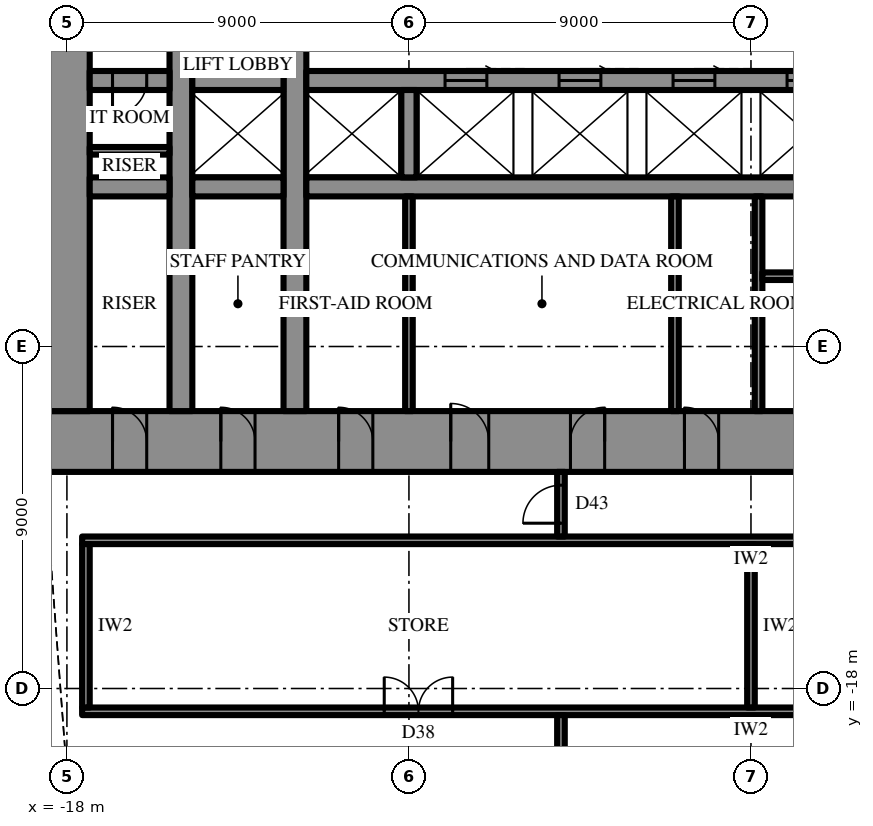
"""IFC4 building model, lengths in metres.
Left out: names, types, materials, properties, quantities, classifications, styles, units other than length and angle.
Written with IfcOpenShell. Run it as: python <this file> out.ifc"""

import sys

from ifc_helpers import new_model, si_unit, direction, frame, frame_2d, origin, place, context, subcontext, project, spatial, rectangle, extrude, element, fill, save


model = new_model("IFC4")
c1 = context("Model", 3, precision=1e-05, world=origin(), true_north=direction((0.0, 1.0)))
c2 = subcontext(c1, "Body", "Model", "MODEL_VIEW")
j1 = project(units=[si_unit("LENGTHUNIT", "METRE"), si_unit("PLANEANGLEUNIT", "RADIAN")], contexts=[c1])
p1 = place(None, origin())
s1 = spatial("IfcSite", under=j1, at=p1, CompositionType="ELEMENT")
p2 = place(p1, origin())
s2 = spatial("IfcBuilding", under=s1, at=p2, CompositionType="ELEMENT")
p3 = place(p2, frame((0.0, 0.0, 174.1)))
s3 = spatial("IfcBuildingStorey", under=s2, at=p3, CompositionType="ELEMENT", Elevation=174.1)
p4 = place(p3, frame((18.6, -11.5, 0.0), z_axis=(0.0, 0.0, 1.0), x_axis=(-1.0, 0.0, 0.0)))
e1 = element("IfcWall", 1, at=p4, inside=s3, PredefinedType="SHEAR", context=c2, shape_type="SweptSolid", body=[
    extrude(rectangle(XDim=37.2, YDim=1.6, at=frame_2d((18.6, 0.0))), origin(), (0.0, 0.0, 1.0), 4.2),
])
p5 = place(p4, frame((19.45, 0.0, 0.0)))
e2 = element("IfcOpeningElement", 2, at=p5, cuts=e1, PredefinedType="OPENING", context=c2, shape_type="SweptSolid", body=[
    extrude(rectangle(XDim=0.9, YDim=2.2, at=frame_2d((0.45, 1.1))), frame((0.0, 0.81, 0.0), z_axis=(0.0, -1.0, 0.0), x_axis=(1.0, 0.0, 0.0)), (0.0, 0.0, 1.0), 1.62),
])
p6 = place(p4, frame((22.45, 0.0, 0.0)))
e3 = element("IfcOpeningElement", 3, at=p6, cuts=e1, PredefinedType="OPENING", context=c2, shape_type="SweptSolid", body=[
    extrude(rectangle(XDim=0.9, YDim=2.2, at=frame_2d((0.45, 1.1))), frame((0.0, 0.81, 0.0), z_axis=(0.0, -1.0, 0.0), x_axis=(1.0, 0.0, 0.0)), (0.0, 0.0, 1.0), 1.62),
])
p7 = place(p4, frame((25.5, 0.0, 0.0)))
e4 = element("IfcOpeningElement", 4, at=p7, cuts=e1, PredefinedType="OPENING", context=c2, shape_type="SweptSolid", body=[
    extrude(rectangle(XDim=1.0, YDim=2.2, at=frame_2d((0.5, 1.1))), frame((0.0, 0.81, 0.0), z_axis=(0.0, -1.0, 0.0), x_axis=(1.0, 0.0, 0.0)), (0.0, 0.0, 1.0), 1.62),
])
p8 = place(p4, frame((1.8, 0.0, 0.0)))
e5 = element("IfcOpeningElement", 5, at=p8, cuts=e1, PredefinedType="OPENING", context=c2, shape_type="SweptSolid", body=[
    extrude(rectangle(XDim=0.9, YDim=2.2, at=frame_2d((0.45, 1.1))), frame((0.0, 0.81, 0.0), z_axis=(0.0, -1.0, 0.0), x_axis=(1.0, 0.0, 0.0)), (0.0, 0.0, 1.0), 1.62),
])
p9 = place(p4, frame((4.65, 0.0, 0.0)))
e6 = element("IfcOpeningElement", 6, at=p9, cuts=e1, PredefinedType="OPENING", context=c2, shape_type="SweptSolid", body=[
    extrude(rectangle(XDim=0.9, YDim=2.2, at=frame_2d((0.45, 1.1))), frame((0.0, 0.81, 0.0), z_axis=(0.0, -1.0, 0.0), x_axis=(1.0, 0.0, 0.0)), (0.0, 0.0, 1.0), 1.62),
])
p10 = place(p4, frame((7.75, 0.0, 0.0)))
e7 = element("IfcOpeningElement", 7, at=p10, cuts=e1, PredefinedType="OPENING", context=c2, shape_type="SweptSolid", body=[
    extrude(rectangle(XDim=0.9, YDim=2.2, at=frame_2d((0.45, 1.1))), frame((0.0, 0.81, 0.0), z_axis=(0.0, -1.0, 0.0), x_axis=(1.0, 0.0, 0.0)), (0.0, 0.0, 1.0), 1.62),
])
p11 = place(p4, frame((28.55, 0.0, 0.0)))
e8 = element("IfcOpeningElement", 8, at=p11, cuts=e1, PredefinedType="OPENING", context=c2, shape_type="SweptSolid", body=[
    extrude(rectangle(XDim=0.9, YDim=2.2, at=frame_2d((0.45, 1.1))), frame((0.0, 0.81, 0.0), z_axis=(0.0, -1.0, 0.0), x_axis=(1.0, 0.0, 0.0)), (0.0, 0.0, 1.0), 1.62),
])
p12 = place(p4, frame((31.65, 0.0, 0.0)))
e9 = element("IfcOpeningElement", 9, at=p12, cuts=e1, PredefinedType="OPENING", context=c2, shape_type="SweptSolid", body=[
    extrude(rectangle(XDim=0.9, YDim=2.2, at=frame_2d((0.45, 1.1))), frame((0.0, 0.81, 0.0), z_axis=(0.0, -1.0, 0.0), x_axis=(1.0, 0.0, 0.0)), (0.0, 0.0, 1.0), 1.62),
])
p13 = place(p4, frame((34.5, 0.0, 0.0)))
e10 = element("IfcOpeningElement", 10, at=p13, cuts=e1, PredefinedType="OPENING", context=c2, shape_type="SweptSolid", body=[
    extrude(rectangle(XDim=0.9, YDim=2.2, at=frame_2d((0.45, 1.1))), frame((0.0, 0.81, 0.0), z_axis=(0.0, -1.0, 0.0), x_axis=(1.0, 0.0, 0.0)), (0.0, 0.0, 1.0), 1.62),
])
p14 = place(p3, frame((-18.0, 10.7, 0.0), z_axis=(0.0, 0.0, 1.0), x_axis=(0.0, -1.0, 0.0)))
e11 = element("IfcWall", 11, at=p14, inside=s3, PredefinedType="SHEAR", context=c2, shape_type="SweptSolid", body=[
    extrude(rectangle(XDim=21.4, YDim=1.2, at=frame_2d((10.7, 0.0))), origin(), (0.0, 0.0, 1.0), 4.2),
])
p15 = place(p14, frame((9.8, 0.0, 0.0)))
e12 = element("IfcOpeningElement", 12, at=p15, cuts=e11, PredefinedType="OPENING", context=c2, shape_type="SweptSolid", body=[
    extrude(rectangle(XDim=1.8, YDim=2.4, at=frame_2d((0.9, 1.2))), frame((0.0, 0.61, 0.0), z_axis=(0.0, -1.0, 0.0), x_axis=(1.0, 0.0, 0.0)), (0.0, 0.0, 1.0), 1.22),
])
p16 = place(p3, frame((-12.0, -10.7, 0.0), z_axis=(0.0, 0.0, 1.0), x_axis=(0.0, 1.0, 0.0)))
e13 = element("IfcWall", 13, at=p16, inside=s3, PredefinedType="SHEAR", context=c2, shape_type="SweptSolid", body=[
    extrude(rectangle(XDim=21.4, YDim=0.6, at=frame_2d((10.7, 0.0))), origin(), (0.0, 0.0, 1.0), 4.2),
])
p17 = place(p16, frame((9.8, 0.0, 0.0)))
e14 = element("IfcOpeningElement", 14, at=p17, cuts=e13, PredefinedType="OPENING", context=c2, shape_type="SweptSolid", body=[
    extrude(rectangle(XDim=1.8, YDim=2.4, at=frame_2d((0.9, 1.2))), frame((0.0, 0.31, 0.0), z_axis=(0.0, -1.0, 0.0), x_axis=(1.0, 0.0, 0.0)), (0.0, 0.0, 1.0), 0.62),
])
p18 = place(p3, frame((-15.0, -10.7, 0.0), z_axis=(0.0, 0.0, 1.0), x_axis=(0.0, 1.0, 0.0)))
e15 = element("IfcWall", 15, at=p18, inside=s3, PredefinedType="SHEAR", context=c2, shape_type="SweptSolid", body=[
    extrude(rectangle(XDim=21.4, YDim=0.6, at=frame_2d((10.7, 0.0))), origin(), (0.0, 0.0, 1.0), 4.2),
])
p19 = place(p18, frame((9.8, 0.0, 0.0)))
e16 = element("IfcOpeningElement", 16, at=p19, cuts=e15, PredefinedType="OPENING", context=c2, shape_type="SweptSolid", body=[
    extrude(rectangle(XDim=1.8, YDim=2.4, at=frame_2d((0.9, 1.2))), frame((0.0, 0.31, 0.0), z_axis=(0.0, -1.0, 0.0), x_axis=(1.0, 0.0, 0.0)), (0.0, 0.0, 1.0), 0.62),
])
p20 = place(p3, frame((3.2, -2.0, 0.0), z_axis=(0.0, 0.0, 1.0), x_axis=(-1.0, 0.0, 0.0)))
e17 = element("IfcWall", 17, at=p20, inside=s3, PredefinedType="SHEAR", context=c2, shape_type="SweptSolid", body=[
    extrude(rectangle(XDim=14.9, YDim=0.5, at=frame_2d((7.45, 0.0))), origin(), (0.0, 0.0, 1.0), 4.2),
])
p21 = place(p20, frame((1.15, 0.0, 0.0)))
e18 = element("IfcOpeningElement", 18, at=p21, cuts=e17, PredefinedType="OPENING", context=c2, shape_type="SweptSolid", body=[
    extrude(rectangle(XDim=1.1, YDim=2.2, at=frame_2d((0.55, 1.1))), frame((0.0, 0.26, 0.0), z_axis=(0.0, -1.0, 0.0), x_axis=(1.0, 0.0, 0.0)), (0.0, 0.0, 1.0), 0.52),
])
p22 = place(p20, frame((4.15, 0.0, 0.0)))
e19 = element("IfcOpeningElement", 19, at=p22, cuts=e17, PredefinedType="OPENING", context=c2, shape_type="SweptSolid", body=[
    extrude(rectangle(XDim=1.1, YDim=2.2, at=frame_2d((0.55, 1.1))), frame((0.0, 0.26, 0.0), z_axis=(0.0, -1.0, 0.0), x_axis=(1.0, 0.0, 0.0)), (0.0, 0.0, 1.0), 0.52),
])
p23 = place(p20, frame((7.15, 0.0, 0.0)))
e20 = element("IfcOpeningElement", 20, at=p23, cuts=e17, PredefinedType="OPENING", context=c2, shape_type="SweptSolid", body=[
    extrude(rectangle(XDim=1.1, YDim=2.2, at=frame_2d((0.55, 1.1))), frame((0.0, 0.26, 0.0), z_axis=(0.0, -1.0, 0.0), x_axis=(1.0, 0.0, 0.0)), (0.0, 0.0, 1.0), 0.52),
])
p24 = place(p20, frame((10.15, 0.0, 0.0)))
e21 = element("IfcOpeningElement", 21, at=p24, cuts=e17, PredefinedType="OPENING", context=c2, shape_type="SweptSolid", body=[
    extrude(rectangle(XDim=1.1, YDim=2.2, at=frame_2d((0.55, 1.1))), frame((0.0, 0.26, 0.0), z_axis=(0.0, -1.0, 0.0), x_axis=(1.0, 0.0, 0.0)), (0.0, 0.0, 1.0), 0.52),
])
p25 = place(p3, frame((-12.3, -2.0, 0.0), z_axis=(0.0, 0.0, 1.0), x_axis=(-1.0, 0.0, 0.0)))
e22 = element("IfcWall", 22, at=p25, inside=s3, PredefinedType="SHEAR", context=c2, shape_type="SweptSolid", body=[
    extrude(rectangle(XDim=2.4, YDim=0.5, at=frame_2d((1.2, 0.0))), origin(), (0.0, 0.0, 1.0), 4.2),
])
p26 = place(p3, frame((-15.3, -2.0, 0.0), z_axis=(0.0, 0.0, 1.0), x_axis=(-1.0, 0.0, 0.0)))
e23 = element("IfcWall", 23, at=p26, inside=s3, PredefinedType="SHEAR", context=c2, shape_type="SweptSolid", body=[
    extrude(rectangle(XDim=2.1, YDim=0.5, at=frame_2d((1.05, 0.0))), origin(), (0.0, 0.0, 1.0), 4.2),
])
p27 = place(p26, frame((0.6, 0.0, 0.0)))
e24 = element("IfcOpeningElement", 24, at=p27, cuts=e23, PredefinedType="OPENING", context=c2, shape_type="SweptSolid", body=[
    extrude(rectangle(XDim=0.9, YDim=2.2, at=frame_2d((0.45, 1.1))), frame((0.0, 0.26, 0.0), z_axis=(0.0, -1.0, 0.0), x_axis=(1.0, 0.0, 0.0)), (0.0, 0.0, 1.0), 0.52),
])
p28 = place(p3, frame((11.7, -4.8, 0.0), z_axis=(0.0, 0.0, 1.0), x_axis=(-1.0, 0.0, 0.0)))
e25 = element("IfcWall", 25, at=p28, inside=s3, PredefinedType="SHEAR", context=c2, shape_type="SweptSolid", body=[
    extrude(rectangle(XDim=23.4, YDim=0.5, at=frame_2d((11.7, 0.0))), origin(), (0.0, 0.0, 1.0), 4.2),
])
p29 = place(p28, frame((6.6, 0.0, 0.0)))
e26 = element("IfcOpeningElement", 26, at=p29, cuts=e25, PredefinedType="OPENING", context=c2, shape_type="SweptSolid", body=[
    extrude(rectangle(XDim=1.2, YDim=2.2, at=frame_2d((0.6, 1.1))), frame((0.0, 0.26, 0.0), z_axis=(0.0, -1.0, 0.0), x_axis=(1.0, 0.0, 0.0)), (0.0, 0.0, 1.0), 0.52),
])
p30 = place(p28, frame((3.6, 0.0, 0.0)))
e27 = element("IfcOpeningElement", 27, at=p30, cuts=e25, PredefinedType="OPENING", context=c2, shape_type="SweptSolid", body=[
    extrude(rectangle(XDim=1.2, YDim=2.2, at=frame_2d((0.6, 1.1))), frame((0.0, 0.26, 0.0), z_axis=(0.0, -1.0, 0.0), x_axis=(1.0, 0.0, 0.0)), (0.0, 0.0, 1.0), 0.52),
])
p31 = place(p3, frame((-12.3, -4.8, 0.0), z_axis=(0.0, 0.0, 1.0), x_axis=(-1.0, 0.0, 0.0)))
e28 = element("IfcWall", 28, at=p31, inside=s3, PredefinedType="SHEAR", context=c2, shape_type="SweptSolid", body=[
    extrude(rectangle(XDim=2.4, YDim=0.5, at=frame_2d((1.2, 0.0))), origin(), (0.0, 0.0, 1.0), 4.2),
])
p32 = place(p3, frame((-15.3, -4.8, 0.0), z_axis=(0.0, 0.0, 1.0), x_axis=(-1.0, 0.0, 0.0)))
e29 = element("IfcWall", 29, at=p32, inside=s3, PredefinedType="SHEAR", context=c2, shape_type="SweptSolid", body=[
    extrude(rectangle(XDim=2.1, YDim=0.5, at=frame_2d((1.05, 0.0))), origin(), (0.0, 0.0, 1.0), 4.2),
])
p33 = place(p3, frame((-9.0, -2.25, 0.0), z_axis=(0.0, 0.0, 1.0), x_axis=(0.0, -1.0, 0.0)))
e30 = element("IfcWall", 30, at=p33, inside=s3, PredefinedType="SHEAR", context=c2, shape_type="SweptSolid", body=[
    extrude(rectangle(XDim=2.3, YDim=0.4, at=frame_2d((1.15, 0.0))), origin(), (0.0, 0.0, 1.0), 4.2),
])
p34 = place(p3, frame((0.2, -5.05, 0.0), z_axis=(0.0, 0.0, 1.0), x_axis=(0.0, -1.0, 0.0)))
e31 = element("IfcWall", 31, at=p34, inside=s3, PredefinedType="SHEAR", context=c2, shape_type="SweptSolid", body=[
    extrude(rectangle(XDim=5.65, YDim=0.2, at=frame_2d((2.825, 0.0))), origin(), (0.0, 0.0, 1.0), 4.2),
])
p35 = place(p3, frame((8.9, -7.15, 0.0), z_axis=(0.0, 0.0, 1.0), x_axis=(-1.0, 0.0, 0.0)))
e32 = element("IfcWall", 32, at=p35, inside=s3, PredefinedType="SHEAR", context=c2, shape_type="SweptSolid", body=[
    extrude(rectangle(XDim=8.6, YDim=0.2, at=frame_2d((4.3, 0.0))), origin(), (0.0, 0.0, 1.0), 4.2),
])
p36 = place(p35, frame((0.3, 0.0, 0.0)))
e33 = element("IfcOpeningElement", 33, at=p36, cuts=e32, PredefinedType="OPENING", context=c2, shape_type="SweptSolid", body=[
    extrude(rectangle(XDim=1.0, YDim=2.2, at=frame_2d((0.5, 1.1))), frame((0.0, 0.11, 0.0), z_axis=(0.0, -1.0, 0.0), x_axis=(1.0, 0.0, 0.0)), (0.0, 0.0, 1.0), 0.22),
])
for number, where, z_axis, x_axis in (
    (34, (-9.0, -5.05, 0.0), (0.0, 0.0, 1.0), (0.0, -1.0, 0.0)),
    (35, (-2.0, -5.05, 0.0), (0.0, 0.0, 1.0), (0.0, -1.0, 0.0)),
):
    element("IfcWall", number, at=place(p3, frame(where, z_axis=z_axis, x_axis=x_axis)), inside=s3, PredefinedType="PARTITIONING", context=c2, shape_type="SweptSolid", body=[
        extrude(rectangle(XDim=5.65, YDim=0.2, at=frame_2d((2.825, 0.0))), origin(), (0.0, 0.0, 1.0), 4.0),
    ])
p37 = place(p3, frame((-15.3, -3.85, 0.0), z_axis=(0.0, 0.0, 1.0), x_axis=(-1.0, 0.0, 0.0)))
e36 = element("IfcWall", 36, at=p37, inside=s3, PredefinedType="PARTITIONING", context=c2, shape_type="SweptSolid", body=[
    extrude(rectangle(XDim=2.1, YDim=0.2, at=frame_2d((1.05, 0.0))), origin(), (0.0, 0.0, 1.0), 4.0),
])
p38 = place(p3, frame((17.6, -14.1, 0.0), z_axis=(0.0, 0.0, 1.0), x_axis=(-1.0, 0.0, 0.0)))
e37 = element("IfcWall", 37, at=p38, inside=s3, PredefinedType="PARTITIONING", context=c2, shape_type="SweptSolid", body=[
    extrude(rectangle(XDim=35.2, YDim=0.2, at=frame_2d((17.6, 0.0))), origin(), (0.0, 0.0, 1.0), 4.0),
])
p39 = place(p3, frame((17.6, -18.6, 0.0), z_axis=(0.0, 0.0, 1.0), x_axis=(-1.0, 0.0, 0.0)))
e38 = element("IfcWall", 38, at=p39, inside=s3, PredefinedType="PARTITIONING", context=c2, shape_type="SweptSolid", body=[
    extrude(rectangle(XDim=35.2, YDim=0.2, at=frame_2d((17.6, 0.0))), origin(), (0.0, 0.0, 1.0), 4.0),
])
p40 = place(p39, frame((7.95, 0.0, 0.0)))
e39 = element("IfcOpeningElement", 39, at=p40, cuts=e38, PredefinedType="OPENING", context=c2, shape_type="SweptSolid", body=[
    extrude(rectangle(XDim=1.8, YDim=2.4, at=frame_2d((0.9, 1.2))), frame((0.0, 0.11, 0.0), z_axis=(0.0, -1.0, 0.0), x_axis=(1.0, 0.0, 0.0)), (0.0, 0.0, 1.0), 0.22),
])
p41 = place(p39, frame((25.45, 0.0, 0.0)))
e40 = element("IfcOpeningElement", 40, at=p41, cuts=e38, PredefinedType="OPENING", context=c2, shape_type="SweptSolid", body=[
    extrude(rectangle(XDim=1.8, YDim=2.4, at=frame_2d((0.9, 1.2))), frame((0.0, 0.11, 0.0), z_axis=(0.0, -1.0, 0.0), x_axis=(1.0, 0.0, 0.0)), (0.0, 0.0, 1.0), 0.22),
])
p42 = place(p3, frame((0.0, -14.2, 0.0), z_axis=(0.0, 0.0, 1.0), x_axis=(0.0, -1.0, 0.0)))
e41 = element("IfcWall", 41, at=p42, inside=s3, PredefinedType="PARTITIONING", context=c2, shape_type="SweptSolid", body=[
    extrude(rectangle(XDim=4.3, YDim=0.2, at=frame_2d((2.15, 0.0))), origin(), (0.0, 0.0, 1.0), 2.992),
])
p43 = place(p3, frame((-17.5, -14.2, 0.0), z_axis=(0.0, 0.0, 1.0), x_axis=(0.0, -1.0, 0.0)))
e42 = element("IfcWall", 42, at=p43, inside=s3, PredefinedType="PARTITIONING", context=c2, shape_type="SweptSolid", body=[
    extrude(rectangle(XDim=4.3, YDim=0.2, at=frame_2d((2.15, 0.0))), origin(), (0.0, 0.0, 1.0), 4.0),
])
p44 = place(p3, frame((-5.0, -12.3, 0.0), z_axis=(0.0, 0.0, 1.0), x_axis=(0.0, -1.0, 0.0)))
e43 = element("IfcWall", 43, at=p44, inside=s3, PredefinedType="PARTITIONING", context=c2, shape_type="SweptSolid", body=[
    extrude(rectangle(XDim=1.7, YDim=0.2, at=frame_2d((0.85, 0.0))), origin(), (0.0, 0.0, 1.0), 2.992),
])
p45 = place(p44, frame((0.35, 0.0, 0.0)))
e44 = element("IfcOpeningElement", 44, at=p45, cuts=e43, PredefinedType="OPENING", context=c2, shape_type="SweptSolid", body=[
    extrude(rectangle(XDim=1.0, YDim=2.2, at=frame_2d((0.5, 1.1))), frame((0.0, 0.11, 0.0), z_axis=(0.0, -1.0, 0.0), x_axis=(1.0, 0.0, 0.0)), (0.0, 0.0, 1.0), 0.22),
])
p46 = place(p3, frame((-5.0, -18.7, 0.0), z_axis=(0.0, 0.0, 1.0), x_axis=(0.0, -1.0, 0.0)))
e45 = element("IfcWall", 45, at=p46, inside=s3, PredefinedType="PARTITIONING", context=c2, shape_type="SweptSolid", body=[
    extrude(rectangle(XDim=6.2, YDim=0.2, at=frame_2d((3.1, 0.0))), origin(), (0.0, 0.0, 1.0), 2.992),
])
p47 = place(p5, frame((0.9, 0.0, 0.0), z_axis=(0.0, 0.0, 1.0), x_axis=(-1.0, 0.0, 0.0)))
e46 = element("IfcDoor", 46, at=p47, inside=s3, OperationType="SINGLE_SWING_RIGHT", PredefinedType="DOOR", context=c2, shape_type="SweptSolid", body=[
    extrude(rectangle(XDim=0.9, YDim=2.2, at=frame_2d((0.45, 1.1))), frame((0.0, 0.025, 0.0), z_axis=(0.0, -1.0, 0.0), x_axis=(1.0, 0.0, 0.0)), (0.0, 0.0, 1.0), 0.05),
])
fill(e2, e46)
p48 = place(p6, frame((0.9, 0.0, 0.0), z_axis=(0.0, 0.0, 1.0), x_axis=(-1.0, 0.0, 0.0)))
e47 = element("IfcDoor", 47, at=p48, inside=s3, OperationType="SINGLE_SWING_LEFT", PredefinedType="DOOR", context=c2, shape_type="SweptSolid", body=[
    extrude(rectangle(XDim=0.9, YDim=2.2, at=frame_2d((0.45, 1.1))), frame((0.0, 0.025, 0.0), z_axis=(0.0, -1.0, 0.0), x_axis=(1.0, 0.0, 0.0)), (0.0, 0.0, 1.0), 0.05),
])
fill(e3, e47)
p49 = place(p7, frame((1.0, 0.0, 0.0), z_axis=(0.0, 0.0, 1.0), x_axis=(-1.0, 0.0, 0.0)))
e48 = element("IfcDoor", 48, at=p49, inside=s3, OperationType="SINGLE_SWING_RIGHT", PredefinedType="DOOR", context=c2, shape_type="SweptSolid", body=[
    extrude(rectangle(XDim=1.0, YDim=2.2, at=frame_2d((0.5, 1.1))), frame((0.0, 0.025, 0.0), z_axis=(0.0, -1.0, 0.0), x_axis=(1.0, 0.0, 0.0)), (0.0, 0.0, 1.0), 0.05),
])
fill(e4, e48)
p50 = place(p11, frame((0.9, 0.0, 0.0), z_axis=(0.0, 0.0, 1.0), x_axis=(-1.0, 0.0, 0.0)))
e49 = element("IfcDoor", 49, at=p50, inside=s3, OperationType="SINGLE_SWING_RIGHT", PredefinedType="DOOR", context=c2, shape_type="SweptSolid", body=[
    extrude(rectangle(XDim=0.9, YDim=2.2, at=frame_2d((0.45, 1.1))), frame((0.0, 0.025, 0.0), z_axis=(0.0, -1.0, 0.0), x_axis=(1.0, 0.0, 0.0)), (0.0, 0.0, 1.0), 0.05),
])
fill(e8, e49)
p51 = place(p12, frame((0.9, 0.0, 0.0), z_axis=(0.0, 0.0, 1.0), x_axis=(-1.0, 0.0, 0.0)))
e50 = element("IfcDoor", 50, at=p51, inside=s3, OperationType="SINGLE_SWING_RIGHT", PredefinedType="DOOR", context=c2, shape_type="SweptSolid", body=[
    extrude(rectangle(XDim=0.9, YDim=2.2, at=frame_2d((0.45, 1.1))), frame((0.0, 0.025, 0.0), z_axis=(0.0, -1.0, 0.0), x_axis=(1.0, 0.0, 0.0)), (0.0, 0.0, 1.0), 0.05),
])
fill(e9, e50)
p52 = place(p13, frame((0.9, 0.0, 0.0), z_axis=(0.0, 0.0, 1.0), x_axis=(-1.0, 0.0, 0.0)))
e51 = element("IfcDoor", 51, at=p52, inside=s3, OperationType="SINGLE_SWING_RIGHT", PredefinedType="DOOR", context=c2, shape_type="SweptSolid", body=[
    extrude(rectangle(XDim=0.9, YDim=2.2, at=frame_2d((0.45, 1.1))), frame((0.0, 0.025, 0.0), z_axis=(0.0, -1.0, 0.0), x_axis=(1.0, 0.0, 0.0)), (0.0, 0.0, 1.0), 0.05),
])
fill(e10, e51)
p53 = place(p27, origin())
e52 = element("IfcDoor", 52, at=p53, inside=s3, OperationType="SINGLE_SWING_LEFT", PredefinedType="DOOR", context=c2, shape_type="SweptSolid", body=[
    extrude(rectangle(XDim=0.9, YDim=2.2, at=frame_2d((0.45, 1.1))), frame((0.0, 0.025, 0.0), z_axis=(0.0, -1.0, 0.0), x_axis=(1.0, 0.0, 0.0)), (0.0, 0.0, 1.0), 0.05),
])
fill(e24, e52)
p54 = place(p21, frame((1.1, 0.0, 0.0), z_axis=(0.0, 0.0, 1.0), x_axis=(-1.0, 0.0, 0.0)))
e53 = element("IfcDoor", 53, at=p54, inside=s3, OperationType="SLIDING_TO_LEFT", PredefinedType="DOOR", context=c2, shape_type="SweptSolid", body=[
    extrude(rectangle(XDim=1.1, YDim=2.2, at=frame_2d((0.55, 1.1))), frame((0.0, 0.025, 0.0), z_axis=(0.0, -1.0, 0.0), x_axis=(1.0, 0.0, 0.0)), (0.0, 0.0, 1.0), 0.05),
])
fill(e18, e53)
p55 = place(p22, frame((1.1, 0.0, 0.0), z_axis=(0.0, 0.0, 1.0), x_axis=(-1.0, 0.0, 0.0)))
e54 = element("IfcDoor", 54, at=p55, inside=s3, OperationType="SLIDING_TO_LEFT", PredefinedType="DOOR", context=c2, shape_type="SweptSolid", body=[
    extrude(rectangle(XDim=1.1, YDim=2.2, at=frame_2d((0.55, 1.1))), frame((0.0, 0.025, 0.0), z_axis=(0.0, -1.0, 0.0), x_axis=(1.0, 0.0, 0.0)), (0.0, 0.0, 1.0), 0.05),
])
fill(e19, e54)
p56 = place(p23, frame((1.1, 0.0, 0.0), z_axis=(0.0, 0.0, 1.0), x_axis=(-1.0, 0.0, 0.0)))
e55 = element("IfcDoor", 55, at=p56, inside=s3, OperationType="SLIDING_TO_LEFT", PredefinedType="DOOR", context=c2, shape_type="SweptSolid", body=[
    extrude(rectangle(XDim=1.1, YDim=2.2, at=frame_2d((0.55, 1.1))), frame((0.0, 0.025, 0.0), z_axis=(0.0, -1.0, 0.0), x_axis=(1.0, 0.0, 0.0)), (0.0, 0.0, 1.0), 0.05),
])
fill(e20, e55)
p57 = place(p24, frame((1.1, 0.0, 0.0), z_axis=(0.0, 0.0, 1.0), x_axis=(-1.0, 0.0, 0.0)))
e56 = element("IfcDoor", 56, at=p57, inside=s3, OperationType="SLIDING_TO_LEFT", PredefinedType="DOOR", context=c2, shape_type="SweptSolid", body=[
    extrude(rectangle(XDim=1.1, YDim=2.2, at=frame_2d((0.55, 1.1))), frame((0.0, 0.025, 0.0), z_axis=(0.0, -1.0, 0.0), x_axis=(1.0, 0.0, 0.0)), (0.0, 0.0, 1.0), 0.05),
])
fill(e21, e56)
p58 = place(p41, frame((1.8, 0.0, 0.0), z_axis=(0.0, 0.0, 1.0), x_axis=(-1.0, 0.0, 0.0)))
e57 = element("IfcDoor", 57, at=p58, inside=s3, OperationType="DOUBLE_DOOR_SINGLE_SWING", PredefinedType="DOOR", context=c2, shape_type="SweptSolid", body=[
    extrude(rectangle(XDim=1.8, YDim=2.4, at=frame_2d((0.9, 1.2))), frame((0.0, 0.025, 0.0), z_axis=(0.0, -1.0, 0.0), x_axis=(1.0, 0.0, 0.0)), (0.0, 0.0, 1.0), 0.05),
])
fill(e40, e57)
p59 = place(p45, frame((1.0, 0.0, 0.0), z_axis=(0.0, 0.0, 1.0), x_axis=(-1.0, 0.0, 0.0)))
e58 = element("IfcDoor", 58, at=p59, inside=s3, OperationType="SINGLE_SWING_RIGHT", PredefinedType="DOOR", context=c2, shape_type="SweptSolid", body=[
    extrude(rectangle(XDim=1.0, YDim=2.2, at=frame_2d((0.5, 1.1))), frame((0.0, 0.025, 0.0), z_axis=(0.0, -1.0, 0.0), x_axis=(1.0, 0.0, 0.0)), (0.0, 0.0, 1.0), 0.05),
])
fill(e44, e58)
save(model, sys.argv[1])
